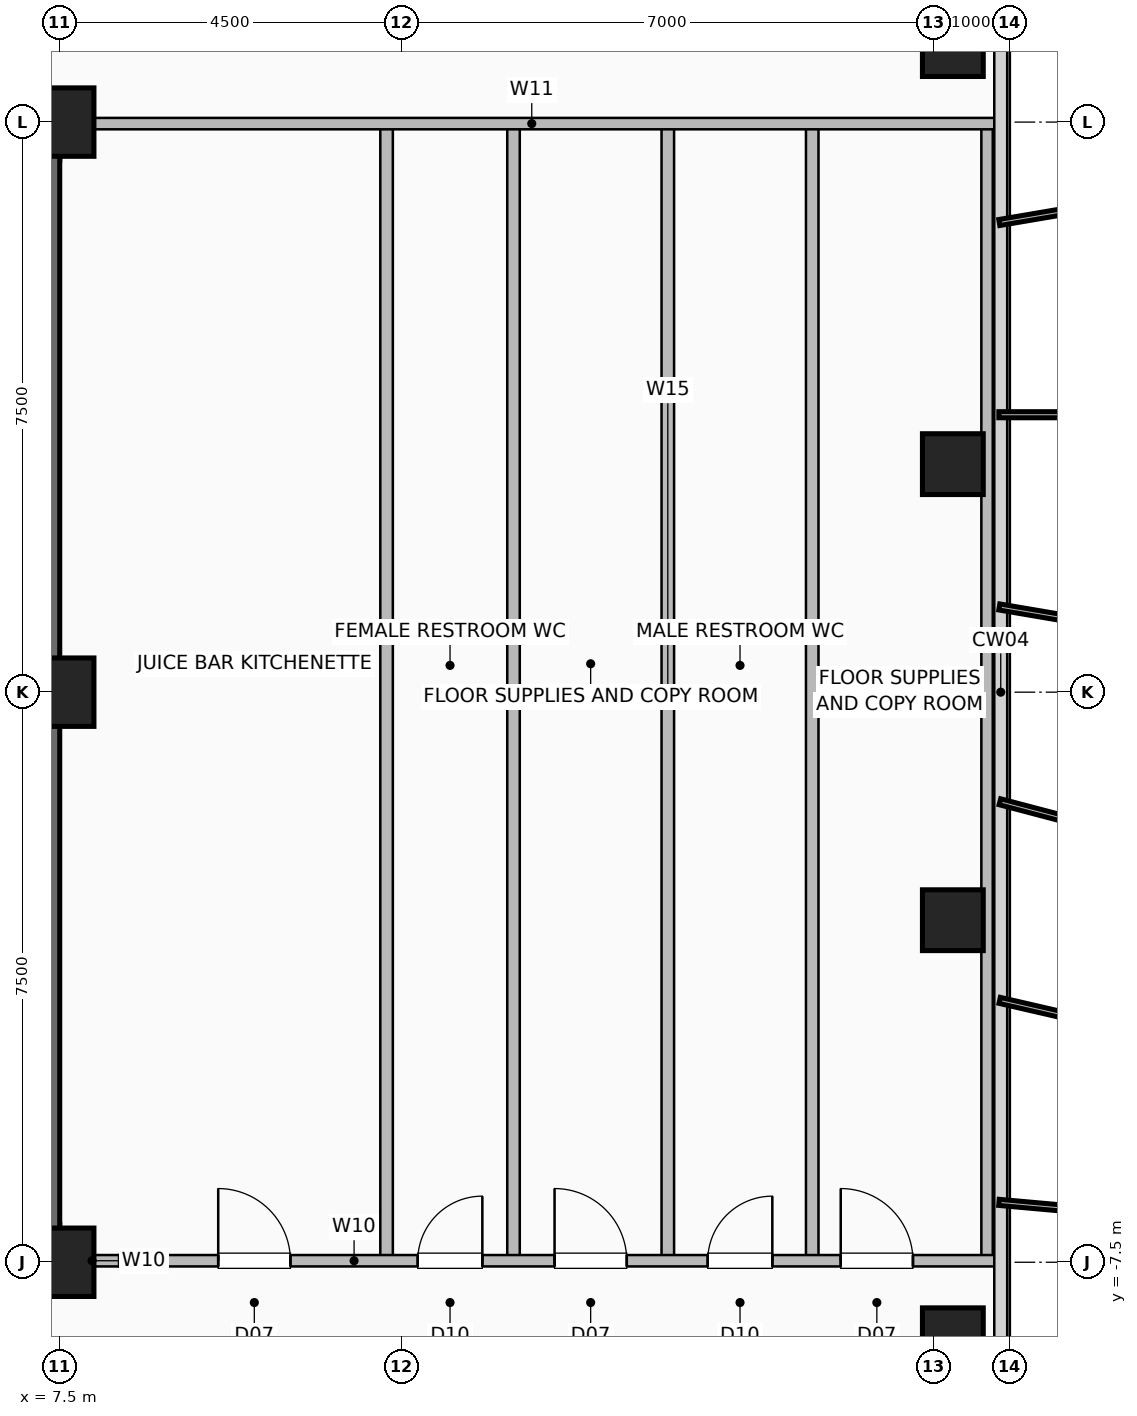
"""IFC4 building model, lengths in metres.
Left out: names, types, materials, properties, quantities, classifications, styles, units other than length and angle.
Written with IfcOpenShell. Run it as: python <this file> out.ifc"""

import sys

from ifc_helpers import new_model, si_unit, direction, frame, frame_2d, origin, origin_2d, place, context, subcontext, project, spatial, rectangle, hollow_rectangle, extrude, element, fill, save


model = new_model("IFC4")
c1 = context("Model", 3, precision=1e-05, world=origin(), true_north=direction((0.0, 1.0)))
c2 = subcontext(c1, "Body", "Model", "MODEL_VIEW")
j1 = project(units=[si_unit("LENGTHUNIT", "METRE"), si_unit("PLANEANGLEUNIT", "RADIAN")], contexts=[c1])
p1 = place(None, origin())
s1 = spatial("IfcSite", under=j1, at=p1, CompositionType="ELEMENT")
p2 = place(p1, origin())
s2 = spatial("IfcBuilding", under=s1, at=p2, CompositionType="ELEMENT")
p3 = place(p2, frame((0.0, 0.0, 205.8)))
s3 = spatial("IfcBuildingStorey", under=s2, at=p3, CompositionType="ELEMENT", Elevation=205.8)
for number, where, z_axis, x_axis in (
    (1, (7.5, -7.5, 0.0), (0.0, 0.0, 1.0), (1.0, 0.0, 0.0)),
    (2, (7.5, 0.0, 0.0), (0.0, 0.0, 1.0), (1.0, 0.0, 0.0)),
    (3, (7.5, 7.5, 0.0), (0.0, 0.0, 1.0), (1.0, 0.0, 0.0)),
):
    element("IfcColumn", number, at=place(p3, frame(where, z_axis=z_axis, x_axis=x_axis)), inside=s3, PredefinedType="COLUMN", context=c2, shape_type="SweptSolid", body=[
        extrude(hollow_rectangle(XDim=0.9, YDim=0.9, WallThickness=0.045, at=origin_2d()), origin(), (0.0, 0.0, 1.0), 3.6),
    ])
for number, where, z_axis, x_axis in (
    (4, (19.25, -8.5, 0.0), (0.0, 0.0, 1.0), (1.0, 0.0, 0.0)),
    (5, (19.25, -3.0, 0.0), (0.0, 0.0, 1.0), (1.0, 0.0, 0.0)),
    (6, (19.25, 3.0, 0.0), (0.0, 0.0, 1.0), (1.0, 0.0, 0.0)),
    (7, (19.25, 8.5, 0.0), (0.0, 0.0, 1.0), (1.0, 0.0, 0.0)),
):
    element("IfcColumn", number, at=place(p3, frame(where, z_axis=z_axis, x_axis=x_axis)), inside=s3, PredefinedType="COLUMN", context=c2, shape_type="SweptSolid", body=[
        extrude(hollow_rectangle(XDim=0.8, YDim=0.8, WallThickness=0.04, at=origin_2d()), origin(), (0.0, 0.0, 1.0), 3.6),
    ])
p4 = place(p3, frame((-7.5, -7.25, 0.0), z_axis=(0.0, 0.0, 1.0), x_axis=(1.0, 0.0, 0.0)))
e8 = element("IfcWall", 8, at=p4, inside=s3, PredefinedType="SHEAR", context=c2, shape_type="SweptSolid", body=[
    extrude(rectangle(XDim=15.0, YDim=0.5, at=frame_2d((7.5, 0.0))), origin(), (0.0, 0.0, 1.0), 3.36),
])
p5 = place(p4, frame((1.55, 0.0, 0.0)))
e9 = element("IfcOpeningElement", 9, at=p5, cuts=e8, PredefinedType="OPENING", context=c2, shape_type="SweptSolid", body=[
    extrude(rectangle(XDim=1.05, YDim=2.08, at=frame_2d((0.525, 1.04))), frame((0.0, 0.26, 0.0), z_axis=(0.0, -1.0, 0.0), x_axis=(1.0, 0.0, 0.0)), (0.0, 0.0, 1.0), 0.52),
])
p6 = place(p4, frame((12.4, 0.0, 0.0)))
e10 = element("IfcOpeningElement", 10, at=p6, cuts=e8, PredefinedType="OPENING", context=c2, shape_type="SweptSolid", body=[
    extrude(rectangle(XDim=1.05, YDim=2.08, at=frame_2d((0.525, 1.04))), frame((0.0, 0.26, 0.0), z_axis=(0.0, -1.0, 0.0), x_axis=(1.0, 0.0, 0.0)), (0.0, 0.0, 1.0), 0.52),
])
p7 = place(p4, frame((4.95, 0.0, 0.0)))
e11 = element("IfcOpeningElement", 11, at=p7, cuts=e8, PredefinedType="OPENING", context=c2, shape_type="SweptSolid", body=[
    extrude(rectangle(XDim=1.0, YDim=2.08, at=frame_2d((0.5, 1.04))), frame((0.0, 0.26, 0.0), z_axis=(0.0, -1.0, 0.0), x_axis=(1.0, 0.0, 0.0)), (0.0, 0.0, 1.0), 0.52),
])
p8 = place(p4, frame((7.05, 0.0, 0.0)))
e12 = element("IfcOpeningElement", 12, at=p8, cuts=e8, PredefinedType="OPENING", context=c2, shape_type="SweptSolid", body=[
    extrude(rectangle(XDim=1.0, YDim=2.08, at=frame_2d((0.5, 1.04))), frame((0.0, 0.26, 0.0), z_axis=(0.0, -1.0, 0.0), x_axis=(1.0, 0.0, 0.0)), (0.0, 0.0, 1.0), 0.52),
])
p9 = place(p4, frame((9.15, 0.0, 0.0)))
e13 = element("IfcOpeningElement", 13, at=p9, cuts=e8, PredefinedType="OPENING", context=c2, shape_type="SweptSolid", body=[
    extrude(rectangle(XDim=1.0, YDim=2.08, at=frame_2d((0.5, 1.04))), frame((0.0, 0.26, 0.0), z_axis=(0.0, -1.0, 0.0), x_axis=(1.0, 0.0, 0.0)), (0.0, 0.0, 1.0), 0.52),
])
for number, where, z_axis, x_axis in (
    (14, (-7.5, 7.25, 0.0), (0.0, 0.0, 1.0), (1.0, 0.0, 0.0)),
    (15, (7.25, -7.5, 0.0), (0.0, 0.0, 1.0), (0.0, 1.0, 0.0)),
):
    element("IfcWall", number, at=place(p3, frame(where, z_axis=z_axis, x_axis=x_axis)), inside=s3, PredefinedType="SHEAR", context=c2, shape_type="SweptSolid", body=[
        extrude(rectangle(XDim=15.0, YDim=0.5, at=frame_2d((7.5, 0.0))), origin(), (0.0, 0.0, 1.0), 3.36),
    ])
p10 = place(p3, frame((7.45, -7.48, 0.0), z_axis=(0.0, 0.0, 1.0), x_axis=(1.0, 0.0, 0.0)))
e16 = element("IfcWall", 16, at=p10, inside=s3, PredefinedType="PARTITIONING", context=c2, shape_type="SweptSolid", body=[
    extrude(rectangle(XDim=0.95, YDim=0.15, at=frame_2d((0.475, 0.0))), origin(), (0.0, 0.0, 1.0), 3.36),
])
for number, where, z_axis, x_axis in (
    (17, (13.47, -7.48, 0.0), (0.0, 0.0, 1.0), (0.0, 1.0, 0.0)),
    (18, (17.4, -7.48, 0.0), (0.0, 0.0, 1.0), (0.0, 1.0, 0.0)),
    (19, (11.8, -7.48, 0.0), (0.0, 0.0, 1.0), (0.0, 1.0, 0.0)),
    (20, (15.5, -7.48, 0.0), (0.0, 0.0, 1.0), (0.0, 1.0, 0.0)),
):
    element("IfcWall", number, at=place(p3, frame(where, z_axis=z_axis, x_axis=x_axis)), inside=s3, PredefinedType="PLUMBINGWALL", context=c2, shape_type="SweptSolid", body=[
        extrude(rectangle(XDim=14.9, YDim=0.165, at=frame_2d((7.45, 0.0))), origin(), (0.0, 0.0, 1.0), 3.36),
    ])
p11 = place(p3, frame((19.7, -7.48, 0.0), z_axis=(0.0, 0.0, 1.0), x_axis=(0.0, 1.0, 0.0)))
e21 = element("IfcWall", 21, at=p11, inside=s3, PredefinedType="PARTITIONING", context=c2, shape_type="SweptSolid", body=[
    extrude(rectangle(XDim=14.9, YDim=0.15, at=frame_2d((7.45, 0.0))), origin(), (0.0, 0.0, 1.0), 3.36),
])
p12 = place(p3, frame((8.28, -7.48, 0.0), z_axis=(0.0, 0.0, 1.0), x_axis=(1.0, 0.0, 0.0)))
e22 = element("IfcWall", 22, at=p12, inside=s3, PredefinedType="PARTITIONING", context=c2, shape_type="SweptSolid", body=[
    extrude(rectangle(XDim=11.54, YDim=0.15, at=frame_2d((5.77, 0.0))), origin(), (0.0, 0.0, 1.0), 3.36),
])
p13 = place(p12, frame((1.305, 0.0, 0.0)))
e23 = element("IfcOpeningElement", 23, at=p13, cuts=e22, PredefinedType="OPENING", context=c2, shape_type="SweptSolid", body=[
    extrude(rectangle(XDim=0.95, YDim=2.06, at=frame_2d((0.475, 1.03))), frame((0.0, 0.085, 0.0), z_axis=(0.0, -1.0, 0.0), x_axis=(1.0, 0.0, 0.0)), (0.0, 0.0, 1.0), 0.17),
])
p14 = place(p12, frame((3.93, 0.0, 0.0)))
e24 = element("IfcOpeningElement", 24, at=p14, cuts=e22, PredefinedType="OPENING", context=c2, shape_type="SweptSolid", body=[
    extrude(rectangle(XDim=0.85, YDim=2.05, at=frame_2d((0.425, 1.025))), frame((0.0, 0.085, 0.0), z_axis=(0.0, -1.0, 0.0), x_axis=(1.0, 0.0, 0.0)), (0.0, 0.0, 1.0), 0.17),
])
p15 = place(p12, frame((5.73, 0.0, 0.0)))
e25 = element("IfcOpeningElement", 25, at=p15, cuts=e22, PredefinedType="OPENING", context=c2, shape_type="SweptSolid", body=[
    extrude(rectangle(XDim=0.95, YDim=2.06, at=frame_2d((0.475, 1.03))), frame((0.0, 0.085, 0.0), z_axis=(0.0, -1.0, 0.0), x_axis=(1.0, 0.0, 0.0)), (0.0, 0.0, 1.0), 0.17),
])
p16 = place(p12, frame((7.745, 0.0, 0.0)))
e26 = element("IfcOpeningElement", 26, at=p16, cuts=e22, PredefinedType="OPENING", context=c2, shape_type="SweptSolid", body=[
    extrude(rectangle(XDim=0.85, YDim=2.05, at=frame_2d((0.425, 1.025))), frame((0.0, 0.085, 0.0), z_axis=(0.0, -1.0, 0.0), x_axis=(1.0, 0.0, 0.0)), (0.0, 0.0, 1.0), 0.17),
])
p17 = place(p12, frame((9.495, 0.0, 0.0)))
e27 = element("IfcOpeningElement", 27, at=p17, cuts=e22, PredefinedType="OPENING", context=c2, shape_type="SweptSolid", body=[
    extrude(rectangle(XDim=0.95, YDim=2.06, at=frame_2d((0.475, 1.03))), frame((0.0, 0.085, 0.0), z_axis=(0.0, -1.0, 0.0), x_axis=(1.0, 0.0, 0.0)), (0.0, 0.0, 1.0), 0.17),
])
p18 = place(p3, frame((7.6, 7.48, 0.0), z_axis=(0.0, 0.0, 1.0), x_axis=(1.0, 0.0, 0.0)))
e28 = element("IfcWall", 28, at=p18, inside=s3, PredefinedType="PARTITIONING", context=c2, shape_type="SweptSolid", body=[
    extrude(rectangle(XDim=12.22, YDim=0.15, at=frame_2d((6.11, 0.0))), origin(), (0.0, 0.0, 1.0), 3.36),
])
p19 = place(p13, origin())
e29 = element("IfcDoor", 29, at=p19, inside=s3, OperationType="SINGLE_SWING_LEFT", PredefinedType="DOOR", context=c2, shape_type="SweptSolid", body=[
    extrude(rectangle(XDim=0.95, YDim=2.06, at=frame_2d((0.475, 1.03))), frame((0.0, 0.025, 0.0), z_axis=(0.0, -1.0, 0.0), x_axis=(1.0, 0.0, 0.0)), (0.0, 0.0, 1.0), 0.05),
])
fill(e23, e29)
p20 = place(p14, origin())
e30 = element("IfcDoor", 30, at=p20, inside=s3, OperationType="SINGLE_SWING_RIGHT", PredefinedType="DOOR", context=c2, shape_type="SweptSolid", body=[
    extrude(rectangle(XDim=0.85, YDim=2.05, at=frame_2d((0.425, 1.025))), frame((0.0, 0.025, 0.0), z_axis=(0.0, -1.0, 0.0), x_axis=(1.0, 0.0, 0.0)), (0.0, 0.0, 1.0), 0.05),
])
fill(e24, e30)
p21 = place(p15, origin())
e31 = element("IfcDoor", 31, at=p21, inside=s3, OperationType="SINGLE_SWING_LEFT", PredefinedType="DOOR", context=c2, shape_type="SweptSolid", body=[
    extrude(rectangle(XDim=0.95, YDim=2.06, at=frame_2d((0.475, 1.03))), frame((0.0, 0.025, 0.0), z_axis=(0.0, -1.0, 0.0), x_axis=(1.0, 0.0, 0.0)), (0.0, 0.0, 1.0), 0.05),
])
fill(e25, e31)
p22 = place(p16, origin())
e32 = element("IfcDoor", 32, at=p22, inside=s3, OperationType="SINGLE_SWING_RIGHT", PredefinedType="DOOR", context=c2, shape_type="SweptSolid", body=[
    extrude(rectangle(XDim=0.85, YDim=2.05, at=frame_2d((0.425, 1.025))), frame((0.0, 0.025, 0.0), z_axis=(0.0, -1.0, 0.0), x_axis=(1.0, 0.0, 0.0)), (0.0, 0.0, 1.0), 0.05),
])
fill(e26, e32)
p23 = place(p17, origin())
e33 = element("IfcDoor", 33, at=p23, inside=s3, OperationType="SINGLE_SWING_LEFT", PredefinedType="DOOR", context=c2, shape_type="SweptSolid", body=[
    extrude(rectangle(XDim=0.95, YDim=2.06, at=frame_2d((0.475, 1.03))), frame((0.0, 0.025, 0.0), z_axis=(0.0, -1.0, 0.0), x_axis=(1.0, 0.0, 0.0)), (0.0, 0.0, 1.0), 0.05),
])
fill(e27, e33)
save(model, sys.argv[1])
